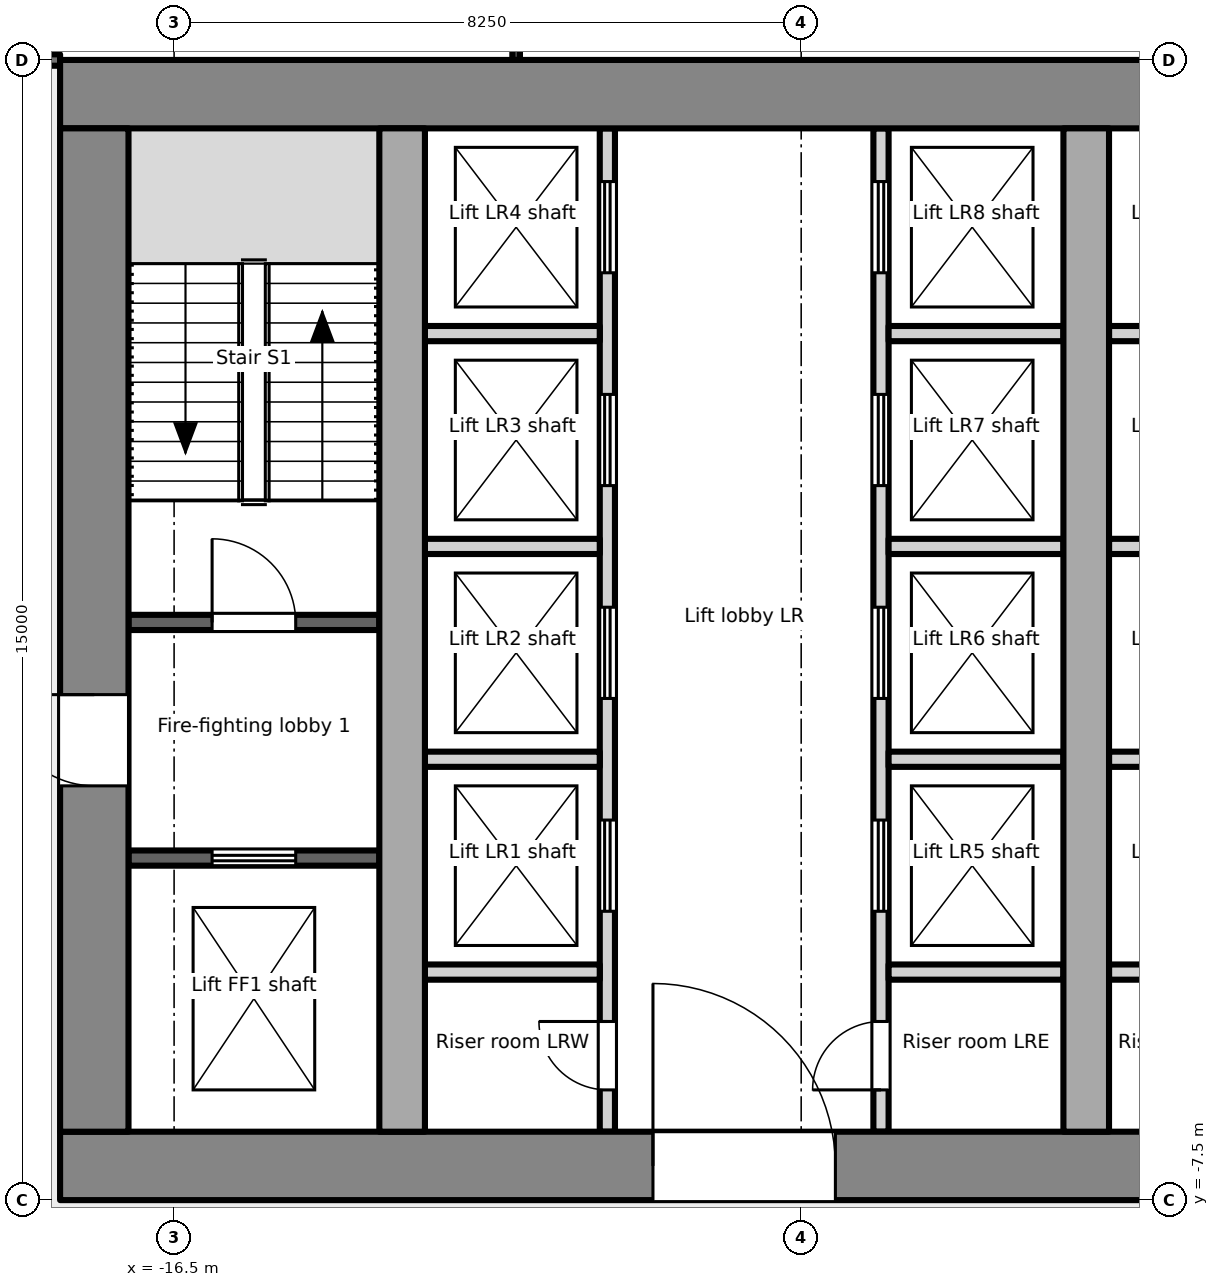
"""IFC4 building model, lengths in metres.
Left out: names, types, materials, properties, quantities, classifications, styles, units other than length and angle.
Written with IfcOpenShell. Run it as: python <this file> out.ifc"""

import sys

from ifc_helpers import new_model, si_unit, direction, frame, frame_2d, origin, place, context, subcontext, project, spatial, rectangle, extrude, element, fill, save


model = new_model("IFC4")
c1 = context("Model", 3, precision=1e-05, world=origin(), true_north=direction((0.0, 1.0)))
c2 = subcontext(c1, "Body", "Model", "MODEL_VIEW")
j1 = project(units=[si_unit("LENGTHUNIT", "METRE"), si_unit("PLANEANGLEUNIT", "RADIAN")], contexts=[c1])
p1 = place(None, origin())
s1 = spatial("IfcSite", under=j1, at=p1, CompositionType="ELEMENT")
p2 = place(p1, origin())
s2 = spatial("IfcBuilding", under=s1, at=p2, CompositionType="ELEMENT")
p3 = place(p2, frame((0.0, 0.0, 17.4)))
s3 = spatial("IfcBuildingStorey", under=s2, at=p3, CompositionType="ELEMENT", Elevation=17.4)
p4 = place(p3, frame((-18.0, -7.05, -0.2), z_axis=(0.0, 0.0, 1.0), x_axis=(1.0, 0.0, 0.0)))
e1 = element("IfcWall", 1, at=p4, inside=s3, PredefinedType="SHEAR", context=c2, shape_type="SweptSolid", body=[
    extrude(rectangle(XDim=36.0, YDim=0.9, at=frame_2d((18.0, 0.0))), origin(), (0.0, 0.0, 1.0), 4.8),
])
p5 = place(p4, frame((7.8, 0.0, 0.2)))
e2 = element("IfcOpeningElement", 2, at=p5, cuts=e1, PredefinedType="OPENING", context=c2, shape_type="SweptSolid", body=[
    extrude(rectangle(XDim=2.4, YDim=2.1, at=frame_2d((1.2, 1.05))), frame((0.0, 0.46, 0.0), z_axis=(0.0, -1.0, 0.0), x_axis=(1.0, 0.0, 0.0)), (0.0, 0.0, 1.0), 0.921),
])
p6 = place(p4, frame((17.4, 0.0, 0.2)))
e3 = element("IfcOpeningElement", 3, at=p6, cuts=e1, PredefinedType="OPENING", context=c2, shape_type="SweptSolid", body=[
    extrude(rectangle(XDim=1.2, YDim=2.1, at=frame_2d((0.6, 1.05))), frame((0.0, 0.46, 0.0), z_axis=(0.0, -1.0, 0.0), x_axis=(1.0, 0.0, 0.0)), (0.0, 0.0, 1.0), 0.921),
])
p7 = place(p4, frame((26.1, 0.0, 0.2)))
e4 = element("IfcOpeningElement", 4, at=p7, cuts=e1, PredefinedType="OPENING", context=c2, shape_type="SweptSolid", body=[
    extrude(rectangle(XDim=2.4, YDim=2.1, at=frame_2d((1.2, 1.05))), frame((0.0, 0.46, 0.0), z_axis=(0.0, -1.0, 0.0), x_axis=(1.0, 0.0, 0.0)), (0.0, 0.0, 1.0), 0.921),
])
p8 = place(p3, frame((-18.0, 7.05, -0.2), z_axis=(0.0, 0.0, 1.0), x_axis=(1.0, 0.0, 0.0)))
e5 = element("IfcWall", 5, at=p8, inside=s3, PredefinedType="SHEAR", context=c2, shape_type="SweptSolid", body=[
    extrude(rectangle(XDim=36.0, YDim=0.9, at=frame_2d((18.0, 0.0))), origin(), (0.0, 0.0, 1.0), 4.8),
])
p9 = place(p3, frame((-17.55, -6.6, -0.2), z_axis=(0.0, 0.0, 1.0), x_axis=(0.0, 1.0, 0.0)))
e6 = element("IfcWall", 6, at=p9, inside=s3, PredefinedType="SHEAR", context=c2, shape_type="SweptSolid", body=[
    extrude(rectangle(XDim=13.2, YDim=0.9, at=frame_2d((6.6, 0.0))), origin(), (0.0, 0.0, 1.0), 4.8),
])
p10 = place(p9, frame((4.55, 0.0, 0.2)))
e7 = element("IfcOpeningElement", 7, at=p10, cuts=e6, PredefinedType="OPENING", context=c2, shape_type="SweptSolid", body=[
    extrude(rectangle(XDim=1.2, YDim=2.1, at=frame_2d((0.6, 1.05))), frame((0.0, 0.46, 0.0), z_axis=(0.0, -1.0, 0.0), x_axis=(1.0, 0.0, 0.0)), (0.0, 0.0, 1.0), 0.921),
])
for number, where, z_axis, x_axis in (
    (8, (-13.5, -6.6, -0.2), (0.0, 0.0, 1.0), (0.0, 1.0, 0.0)),
    (9, (-4.5, -6.6, -0.2), (0.0, 0.0, 1.0), (0.0, 1.0, 0.0)),
):
    element("IfcWall", number, at=place(p3, frame(where, z_axis=z_axis, x_axis=x_axis)), inside=s3, PredefinedType="SHEAR", context=c2, shape_type="SweptSolid", body=[
        extrude(rectangle(XDim=13.2, YDim=0.6, at=frame_2d((6.6, 0.0))), origin(), (0.0, 0.0, 1.0), 4.8),
    ])
p11 = place(p3, frame((-17.1, -3.0, 0.0), z_axis=(0.0, 0.0, 1.0), x_axis=(1.0, 0.0, 0.0)))
e10 = element("IfcWall", 10, at=p11, inside=s3, PredefinedType="PARTITIONING", context=c2, shape_type="SweptSolid", body=[
    extrude(rectangle(XDim=3.3, YDim=0.2, at=frame_2d((1.65, 0.0))), origin(), (0.0, 0.0, 1.0), 4.6),
])
p12 = place(p11, frame((1.1, 0.0, 0.0)))
e11 = element("IfcOpeningElement", 11, at=p12, cuts=e10, PredefinedType="OPENING", context=c2, shape_type="SweptSolid", body=[
    extrude(rectangle(XDim=1.1, YDim=2.1, at=frame_2d((0.55, 1.05))), frame((0.0, 0.111, 0.0), z_axis=(0.0, -1.0, 0.0), x_axis=(1.0, 0.0, 0.0)), (0.0, 0.0, 1.0), 0.221),
])
p13 = place(p3, frame((-17.1, 0.1, 0.0), z_axis=(0.0, 0.0, 1.0), x_axis=(1.0, 0.0, 0.0)))
e12 = element("IfcWall", 12, at=p13, inside=s3, PredefinedType="PARTITIONING", context=c2, shape_type="SweptSolid", body=[
    extrude(rectangle(XDim=3.3, YDim=0.2, at=frame_2d((1.65, 0.0))), origin(), (0.0, 0.0, 1.0), 4.6),
])
p14 = place(p13, frame((1.1, 0.0, 0.0)))
e13 = element("IfcOpeningElement", 13, at=p14, cuts=e12, PredefinedType="OPENING", context=c2, shape_type="SweptSolid", body=[
    extrude(rectangle(XDim=1.1, YDim=2.1, at=frame_2d((0.55, 1.05))), frame((0.0, 0.111, 0.0), z_axis=(0.0, -1.0, 0.0), x_axis=(1.0, 0.0, 0.0)), (0.0, 0.0, 1.0), 0.221),
])
p15 = place(p3, frame((-10.8, -6.6, 0.0), z_axis=(0.0, 0.0, 1.0), x_axis=(0.0, 1.0, 0.0)))
e14 = element("IfcWall", 14, at=p15, inside=s3, PredefinedType="PARTITIONING", context=c2, shape_type="SweptSolid", body=[
    extrude(rectangle(XDim=13.2, YDim=0.2, at=frame_2d((6.6, 0.0))), origin(), (0.0, 0.0, 1.0), 4.6),
])
p16 = place(p15, frame((0.55, 0.0, 0.0)))
e15 = element("IfcOpeningElement", 15, at=p16, cuts=e14, PredefinedType="OPENING", context=c2, shape_type="SweptSolid", body=[
    extrude(rectangle(XDim=0.9, YDim=2.1, at=frame_2d((0.45, 1.05))), frame((0.0, 0.111, 0.0), z_axis=(0.0, -1.0, 0.0), x_axis=(1.0, 0.0, 0.0)), (0.0, 0.0, 1.0), 0.221),
])
p17 = place(p15, frame((2.9, 0.0, 0.0)))
e16 = element("IfcOpeningElement", 16, at=p17, cuts=e14, PredefinedType="OPENING", context=c2, shape_type="SweptSolid", body=[
    extrude(rectangle(XDim=1.2, YDim=2.1, at=frame_2d((0.6, 1.05))), frame((0.0, 0.111, 0.0), z_axis=(0.0, -1.0, 0.0), x_axis=(1.0, 0.0, 0.0)), (0.0, 0.0, 1.0), 0.221),
])
p18 = place(p15, frame((5.7, 0.0, 0.0)))
e17 = element("IfcOpeningElement", 17, at=p18, cuts=e14, PredefinedType="OPENING", context=c2, shape_type="SweptSolid", body=[
    extrude(rectangle(XDim=1.2, YDim=2.1, at=frame_2d((0.6, 1.05))), frame((0.0, 0.111, 0.0), z_axis=(0.0, -1.0, 0.0), x_axis=(1.0, 0.0, 0.0)), (0.0, 0.0, 1.0), 0.221),
])
p19 = place(p15, frame((8.5, 0.0, 0.0)))
e18 = element("IfcOpeningElement", 18, at=p19, cuts=e14, PredefinedType="OPENING", context=c2, shape_type="SweptSolid", body=[
    extrude(rectangle(XDim=1.2, YDim=2.1, at=frame_2d((0.6, 1.05))), frame((0.0, 0.111, 0.0), z_axis=(0.0, -1.0, 0.0), x_axis=(1.0, 0.0, 0.0)), (0.0, 0.0, 1.0), 0.221),
])
p20 = place(p15, frame((11.3, 0.0, 0.0)))
e19 = element("IfcOpeningElement", 19, at=p20, cuts=e14, PredefinedType="OPENING", context=c2, shape_type="SweptSolid", body=[
    extrude(rectangle(XDim=1.2, YDim=2.1, at=frame_2d((0.6, 1.05))), frame((0.0, 0.111, 0.0), z_axis=(0.0, -1.0, 0.0), x_axis=(1.0, 0.0, 0.0)), (0.0, 0.0, 1.0), 0.221),
])
p21 = place(p3, frame((-7.2, -6.6, 0.0), z_axis=(0.0, 0.0, 1.0), x_axis=(0.0, 1.0, 0.0)))
e20 = element("IfcWall", 20, at=p21, inside=s3, PredefinedType="PARTITIONING", context=c2, shape_type="SweptSolid", body=[
    extrude(rectangle(XDim=13.2, YDim=0.2, at=frame_2d((6.6, 0.0))), origin(), (0.0, 0.0, 1.0), 4.6),
])
p22 = place(p21, frame((0.55, 0.0, 0.0)))
e21 = element("IfcOpeningElement", 21, at=p22, cuts=e20, PredefinedType="OPENING", context=c2, shape_type="SweptSolid", body=[
    extrude(rectangle(XDim=0.9, YDim=2.1, at=frame_2d((0.45, 1.05))), frame((0.0, 0.111, 0.0), z_axis=(0.0, -1.0, 0.0), x_axis=(1.0, 0.0, 0.0)), (0.0, 0.0, 1.0), 0.221),
])
p23 = place(p21, frame((2.9, 0.0, 0.0)))
e22 = element("IfcOpeningElement", 22, at=p23, cuts=e20, PredefinedType="OPENING", context=c2, shape_type="SweptSolid", body=[
    extrude(rectangle(XDim=1.2, YDim=2.1, at=frame_2d((0.6, 1.05))), frame((0.0, 0.111, 0.0), z_axis=(0.0, -1.0, 0.0), x_axis=(1.0, 0.0, 0.0)), (0.0, 0.0, 1.0), 0.221),
])
p24 = place(p21, frame((5.7, 0.0, 0.0)))
e23 = element("IfcOpeningElement", 23, at=p24, cuts=e20, PredefinedType="OPENING", context=c2, shape_type="SweptSolid", body=[
    extrude(rectangle(XDim=1.2, YDim=2.1, at=frame_2d((0.6, 1.05))), frame((0.0, 0.111, 0.0), z_axis=(0.0, -1.0, 0.0), x_axis=(1.0, 0.0, 0.0)), (0.0, 0.0, 1.0), 0.221),
])
p25 = place(p21, frame((8.5, 0.0, 0.0)))
e24 = element("IfcOpeningElement", 24, at=p25, cuts=e20, PredefinedType="OPENING", context=c2, shape_type="SweptSolid", body=[
    extrude(rectangle(XDim=1.2, YDim=2.1, at=frame_2d((0.6, 1.05))), frame((0.0, 0.111, 0.0), z_axis=(0.0, -1.0, 0.0), x_axis=(1.0, 0.0, 0.0)), (0.0, 0.0, 1.0), 0.221),
])
p26 = place(p21, frame((11.3, 0.0, 0.0)))
e25 = element("IfcOpeningElement", 25, at=p26, cuts=e20, PredefinedType="OPENING", context=c2, shape_type="SweptSolid", body=[
    extrude(rectangle(XDim=1.2, YDim=2.1, at=frame_2d((0.6, 1.05))), frame((0.0, 0.111, 0.0), z_axis=(0.0, -1.0, 0.0), x_axis=(1.0, 0.0, 0.0)), (0.0, 0.0, 1.0), 0.221),
])
for number, where, z_axis, x_axis in (
    (26, (-13.2, -1.7, 0.0), (0.0, 0.0, 1.0), (1.0, 0.0, 0.0)),
    (27, (-13.2, 1.1, 0.0), (0.0, 0.0, 1.0), (1.0, 0.0, 0.0)),
    (28, (-13.2, 3.9, 0.0), (0.0, 0.0, 1.0), (1.0, 0.0, 0.0)),
    (29, (-13.2, -4.5, 0.0), (0.0, 0.0, 1.0), (1.0, 0.0, 0.0)),
    (30, (-7.1, -1.7, 0.0), (0.0, 0.0, 1.0), (1.0, 0.0, 0.0)),
    (31, (-7.1, 1.1, 0.0), (0.0, 0.0, 1.0), (1.0, 0.0, 0.0)),
    (32, (-7.1, 3.9, 0.0), (0.0, 0.0, 1.0), (1.0, 0.0, 0.0)),
    (33, (-7.1, -4.5, 0.0), (0.0, 0.0, 1.0), (1.0, 0.0, 0.0)),
    (34, (-4.2, -1.7, 0.0), (0.0, 0.0, 1.0), (1.0, 0.0, 0.0)),
    (35, (-4.2, 1.1, 0.0), (0.0, 0.0, 1.0), (1.0, 0.0, 0.0)),
    (36, (-4.2, 3.9, 0.0), (0.0, 0.0, 1.0), (1.0, 0.0, 0.0)),
    (37, (-4.2, -4.5, 0.0), (0.0, 0.0, 1.0), (1.0, 0.0, 0.0)),
):
    element("IfcWall", number, at=place(p3, frame(where, z_axis=z_axis, x_axis=x_axis)), inside=s3, PredefinedType="PARTITIONING", context=c2, shape_type="SweptSolid", body=[
        extrude(rectangle(XDim=2.3, YDim=0.2, at=frame_2d((1.15, 0.0))), origin(), (0.0, 0.0, 1.0), 4.6),
    ])
p27 = place(p3, frame((-20.91, 7.499, 0.0), z_axis=(0.0, 0.0, 1.0), x_axis=(1.0, 0.0, 0.0)))
e38 = element("IfcWall", 38, at=p27, inside=s3, PredefinedType="PARTITIONING", context=c2, shape_type="SweptSolid", body=[
    extrude(rectangle(XDim=2.91, YDim=0.15, at=frame_2d((1.455, 0.0))), origin(), (0.0, 0.0, 1.0), 4.3),
])
p28 = place(p3, frame((-12.0, 7.5, 0.0), z_axis=(0.0, 0.0, 1.0), x_axis=(0.0, 1.0, 0.0)))
e39 = element("IfcWall", 39, at=p28, inside=s3, PredefinedType="PARTITIONING", context=c2, shape_type="SweptSolid", body=[
    extrude(rectangle(XDim=3.0, YDim=0.1, at=frame_2d((1.5, 0.0))), origin(), (0.0, 0.0, 1.0), 4.6),
])
p29 = place(p12, origin())
e40 = element("IfcDoor", 40, at=p29, inside=s3, OperationType="DOUBLE_DOOR_SLIDING", PredefinedType="DOOR", context=c2, shape_type="SweptSolid", body=[
    extrude(rectangle(XDim=1.1, YDim=2.1, at=frame_2d((0.55, 1.05))), frame((0.0, 0.025, 0.0), z_axis=(0.0, -1.0, 0.0), x_axis=(1.0, 0.0, 0.0)), (0.0, 0.0, 1.0), 0.05),
])
fill(e11, e40)
p30 = place(p10, origin())
e41 = element("IfcDoor", 41, at=p30, inside=s3, OperationType="SINGLE_SWING_RIGHT", PredefinedType="DOOR", context=c2, shape_type="SweptSolid", body=[
    extrude(rectangle(XDim=1.2, YDim=2.1, at=frame_2d((0.6, 1.05))), frame((0.0, 0.025, 0.0), z_axis=(0.0, -1.0, 0.0), x_axis=(1.0, 0.0, 0.0)), (0.0, 0.0, 1.0), 0.05),
])
fill(e7, e41)
p31 = place(p14, origin())
e42 = element("IfcDoor", 42, at=p31, inside=s3, OperationType="SINGLE_SWING_LEFT", PredefinedType="DOOR", context=c2, shape_type="SweptSolid", body=[
    extrude(rectangle(XDim=1.1, YDim=2.1, at=frame_2d((0.55, 1.05))), frame((0.0, 0.025, 0.0), z_axis=(0.0, -1.0, 0.0), x_axis=(1.0, 0.0, 0.0)), (0.0, 0.0, 1.0), 0.05),
])
fill(e13, e42)
p32 = place(p16, origin())
e43 = element("IfcDoor", 43, at=p32, inside=s3, OperationType="SINGLE_SWING_RIGHT", PredefinedType="DOOR", context=c2, shape_type="SweptSolid", body=[
    extrude(rectangle(XDim=0.9, YDim=2.1, at=frame_2d((0.45, 1.05))), frame((0.0, 0.025, 0.0), z_axis=(0.0, -1.0, 0.0), x_axis=(1.0, 0.0, 0.0)), (0.0, 0.0, 1.0), 0.05),
])
fill(e15, e43)
p33 = place(p17, origin())
e44 = element("IfcDoor", 44, at=p33, inside=s3, OperationType="DOUBLE_DOOR_SLIDING", PredefinedType="DOOR", context=c2, shape_type="SweptSolid", body=[
    extrude(rectangle(XDim=1.2, YDim=2.1, at=frame_2d((0.6, 1.05))), frame((0.0, 0.025, 0.0), z_axis=(0.0, -1.0, 0.0), x_axis=(1.0, 0.0, 0.0)), (0.0, 0.0, 1.0), 0.05),
])
fill(e16, e44)
p34 = place(p18, origin())
e45 = element("IfcDoor", 45, at=p34, inside=s3, OperationType="DOUBLE_DOOR_SLIDING", PredefinedType="DOOR", context=c2, shape_type="SweptSolid", body=[
    extrude(rectangle(XDim=1.2, YDim=2.1, at=frame_2d((0.6, 1.05))), frame((0.0, 0.025, 0.0), z_axis=(0.0, -1.0, 0.0), x_axis=(1.0, 0.0, 0.0)), (0.0, 0.0, 1.0), 0.05),
])
fill(e17, e45)
p35 = place(p19, origin())
e46 = element("IfcDoor", 46, at=p35, inside=s3, OperationType="DOUBLE_DOOR_SLIDING", PredefinedType="DOOR", context=c2, shape_type="SweptSolid", body=[
    extrude(rectangle(XDim=1.2, YDim=2.1, at=frame_2d((0.6, 1.05))), frame((0.0, 0.025, 0.0), z_axis=(0.0, -1.0, 0.0), x_axis=(1.0, 0.0, 0.0)), (0.0, 0.0, 1.0), 0.05),
])
fill(e18, e46)
p36 = place(p20, origin())
e47 = element("IfcDoor", 47, at=p36, inside=s3, OperationType="DOUBLE_DOOR_SLIDING", PredefinedType="DOOR", context=c2, shape_type="SweptSolid", body=[
    extrude(rectangle(XDim=1.2, YDim=2.1, at=frame_2d((0.6, 1.05))), frame((0.0, 0.025, 0.0), z_axis=(0.0, -1.0, 0.0), x_axis=(1.0, 0.0, 0.0)), (0.0, 0.0, 1.0), 0.05),
])
fill(e19, e47)
p37 = place(p22, origin())
e48 = element("IfcDoor", 48, at=p37, inside=s3, OperationType="SINGLE_SWING_LEFT", PredefinedType="DOOR", context=c2, shape_type="SweptSolid", body=[
    extrude(rectangle(XDim=0.9, YDim=2.1, at=frame_2d((0.45, 1.05))), frame((0.0, 0.025, 0.0), z_axis=(0.0, -1.0, 0.0), x_axis=(1.0, 0.0, 0.0)), (0.0, 0.0, 1.0), 0.05),
])
fill(e21, e48)
p38 = place(p23, origin())
e49 = element("IfcDoor", 49, at=p38, inside=s3, OperationType="DOUBLE_DOOR_SLIDING", PredefinedType="DOOR", context=c2, shape_type="SweptSolid", body=[
    extrude(rectangle(XDim=1.2, YDim=2.1, at=frame_2d((0.6, 1.05))), frame((0.0, 0.025, 0.0), z_axis=(0.0, -1.0, 0.0), x_axis=(1.0, 0.0, 0.0)), (0.0, 0.0, 1.0), 0.05),
])
fill(e22, e49)
p39 = place(p24, origin())
e50 = element("IfcDoor", 50, at=p39, inside=s3, OperationType="DOUBLE_DOOR_SLIDING", PredefinedType="DOOR", context=c2, shape_type="SweptSolid", body=[
    extrude(rectangle(XDim=1.2, YDim=2.1, at=frame_2d((0.6, 1.05))), frame((0.0, 0.025, 0.0), z_axis=(0.0, -1.0, 0.0), x_axis=(1.0, 0.0, 0.0)), (0.0, 0.0, 1.0), 0.05),
])
fill(e23, e50)
p40 = place(p25, origin())
e51 = element("IfcDoor", 51, at=p40, inside=s3, OperationType="DOUBLE_DOOR_SLIDING", PredefinedType="DOOR", context=c2, shape_type="SweptSolid", body=[
    extrude(rectangle(XDim=1.2, YDim=2.1, at=frame_2d((0.6, 1.05))), frame((0.0, 0.025, 0.0), z_axis=(0.0, -1.0, 0.0), x_axis=(1.0, 0.0, 0.0)), (0.0, 0.0, 1.0), 0.05),
])
fill(e24, e51)
p41 = place(p26, origin())
e52 = element("IfcDoor", 52, at=p41, inside=s3, OperationType="DOUBLE_DOOR_SLIDING", PredefinedType="DOOR", context=c2, shape_type="SweptSolid", body=[
    extrude(rectangle(XDim=1.2, YDim=2.1, at=frame_2d((0.6, 1.05))), frame((0.0, 0.025, 0.0), z_axis=(0.0, -1.0, 0.0), x_axis=(1.0, 0.0, 0.0)), (0.0, 0.0, 1.0), 0.05),
])
fill(e25, e52)
p42 = place(p5, origin())
e53 = element("IfcDoor", 53, at=p42, inside=s3, OperationType="DOUBLE_DOOR_DOUBLE_SWING", PredefinedType="DOOR", context=c2, shape_type="SweptSolid", body=[
    extrude(rectangle(XDim=2.4, YDim=2.1, at=frame_2d((1.2, 1.05))), frame((0.0, 0.025, 0.0), z_axis=(0.0, -1.0, 0.0), x_axis=(1.0, 0.0, 0.0)), (0.0, 0.0, 1.0), 0.05),
])
fill(e2, e53)
save(model, sys.argv[1])
